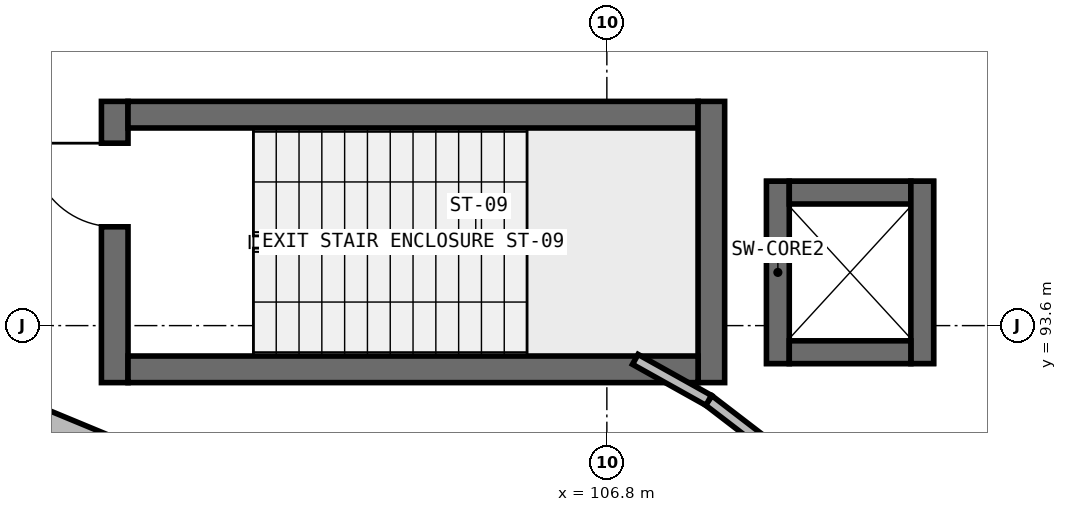
"""IFC4 building model, lengths in metres.
Left out: names, types, materials, properties, quantities, classifications, styles, units other than length and angle.
Written with IfcOpenShell. Run it as: python <this file> out.ifc"""

import sys

from ifc_helpers import new_model, si_unit, direction, frame, frame_2d, origin, place, context, subcontext, project, spatial, rectangle, extrude, element, fill, save


model = new_model("IFC4")
c1 = context("Model", 3, precision=1e-05, world=origin(), true_north=direction((0.0, 1.0)))
c2 = subcontext(c1, "Body", "Model", "MODEL_VIEW")
j1 = project(units=[si_unit("LENGTHUNIT", "METRE"), si_unit("PLANEANGLEUNIT", "RADIAN")], contexts=[c1])
p1 = place(None, origin())
s1 = spatial("IfcSite", under=j1, at=p1, CompositionType="ELEMENT")
p2 = place(p1, origin())
s2 = spatial("IfcBuilding", under=s1, at=p2, CompositionType="ELEMENT")
p3 = place(p2, frame((0.0, 0.0, 9.8)))
s3 = spatial("IfcBuildingStorey", under=s2, at=p3, CompositionType="ELEMENT", Elevation=9.8)
p4 = place(p3, frame((100.325, 92.85, 0.0), z_axis=(0.0, 0.0, 1.0), x_axis=(0.0, 1.0, 0.0)))
e1 = element("IfcWall", 1, at=p4, inside=s3, PredefinedType="SHEAR", context=c2, shape_type="SweptSolid", body=[
    extrude(rectangle(XDim=3.7, YDim=0.35, at=frame_2d((1.85, 0.0))), origin(), (0.0, 0.0, 1.0), 4.55),
])
p5 = place(p4, frame((2.05, 0.0, 0.0)))
e2 = element("IfcOpeningElement", 2, at=p5, cuts=e1, PredefinedType="OPENING", context=c2, shape_type="SweptSolid", body=[
    extrude(rectangle(XDim=1.1, YDim=2.15, at=frame_2d((0.55, 1.075))), frame((0.0, 0.185, 0.0), z_axis=(0.0, -1.0, 0.0), x_axis=(1.0, 0.0, 0.0)), (0.0, 0.0, 1.0), 0.37),
])
p6 = place(p3, frame((100.5, 96.375, 0.0), z_axis=(0.0, 0.0, 1.0), x_axis=(1.0, 0.0, 0.0)))
e3 = element("IfcWall", 3, at=p6, inside=s3, PredefinedType="SHEAR", context=c2, shape_type="SweptSolid", body=[
    extrude(rectangle(XDim=7.5, YDim=0.35, at=frame_2d((3.75, 0.0))), origin(), (0.0, 0.0, 1.0), 4.55),
])
p7 = place(p3, frame((108.175, 96.55, 0.0), z_axis=(0.0, 0.0, 1.0), x_axis=(0.0, -1.0, 0.0)))
e4 = element("IfcWall", 4, at=p7, inside=s3, PredefinedType="SHEAR", context=c2, shape_type="SweptSolid", body=[
    extrude(rectangle(XDim=3.7, YDim=0.35, at=frame_2d((1.85, 0.0))), origin(), (0.0, 0.0, 1.0), 4.55),
])
p8 = place(p3, frame((108.0, 93.025, 0.0), z_axis=(0.0, 0.0, 1.0), x_axis=(-1.0, 0.0, 0.0)))
e5 = element("IfcWall", 5, at=p8, inside=s3, PredefinedType="SHEAR", context=c2, shape_type="SweptSolid", body=[
    extrude(rectangle(XDim=7.5, YDim=0.35, at=frame_2d((3.75, 0.0))), origin(), (0.0, 0.0, 1.0), 4.55),
])
p9 = place(p3, frame((109.05, 93.1, 0.0), z_axis=(0.0, 0.0, 1.0), x_axis=(0.0, 1.0, 0.0)))
e6 = element("IfcWall", 6, at=p9, inside=s3, PredefinedType="SHEAR", context=c2, shape_type="SweptSolid", body=[
    extrude(rectangle(XDim=2.4, YDim=0.3, at=frame_2d((1.2, 0.0))), origin(), (0.0, 0.0, 1.0), 4.37),
])
p10 = place(p3, frame((109.2, 95.35, 0.0), z_axis=(0.0, 0.0, 1.0), x_axis=(1.0, 0.0, 0.0)))
e7 = element("IfcWall", 7, at=p10, inside=s3, PredefinedType="SHEAR", context=c2, shape_type="SweptSolid", body=[
    extrude(rectangle(XDim=1.6, YDim=0.3, at=frame_2d((0.8, 0.0))), origin(), (0.0, 0.0, 1.0), 4.37),
])
p11 = place(p3, frame((110.95, 95.5, 0.0), z_axis=(0.0, 0.0, 1.0), x_axis=(0.0, -1.0, 0.0)))
e8 = element("IfcWall", 8, at=p11, inside=s3, PredefinedType="SHEAR", context=c2, shape_type="SweptSolid", body=[
    extrude(rectangle(XDim=2.4, YDim=0.3, at=frame_2d((1.2, 0.0))), origin(), (0.0, 0.0, 1.0), 4.37),
])
p12 = place(p3, frame((110.8, 93.25, 0.0), z_axis=(0.0, 0.0, 1.0), x_axis=(-1.0, 0.0, 0.0)))
e9 = element("IfcWall", 9, at=p12, inside=s3, PredefinedType="SHEAR", context=c2, shape_type="SweptSolid", body=[
    extrude(rectangle(XDim=1.6, YDim=0.3, at=frame_2d((0.8, 0.0))), origin(), (0.0, 0.0, 1.0), 4.37),
])
p13 = place(p3, frame((106.325, 89.483, 0.0), z_axis=(0.0, 0.0, 1.0), x_axis=(-0.92385889973, 0.382733240508, 0.0)))
e10 = element("IfcWall", 10, at=p13, inside=s3, PredefinedType="SOLIDWALL", context=c2, shape_type="SweptSolid", body=[
    extrude(rectangle(XDim=10.081, YDim=0.29, at=frame_2d((5.04, 0.0))), origin(), (0.0, 0.0, 1.0), 4.37),
])
p14 = place(p13, frame((4.295, 0.0, 0.95)))
e11 = element("IfcOpeningElement", 11, at=p14, cuts=e10, PredefinedType="OPENING", context=c2, shape_type="SweptSolid", body=[
    extrude(rectangle(XDim=1.49, YDim=1.59, at=frame_2d((0.745, 0.795))), frame((0.0, 0.155, 0.0), z_axis=(0.0, -1.0, 0.0), x_axis=(1.0, 0.0, 0.0)), (0.0, 0.0, 1.0), 0.31),
])
p15 = place(p3, frame((96.748, 92.366, 0.0), z_axis=(0.0, 0.0, 1.0), x_axis=(0.923848052238, -0.382759423628, 0.0)))
e12 = element("IfcWall", 12, at=p15, inside=s3, PredefinedType="SOLIDWALL", context=c2, shape_type="SweptSolid", body=[
    extrude(rectangle(XDim=9.821, YDim=0.29, at=frame_2d((4.91, 0.0))), origin(), (0.0, 0.0, 1.0), 4.37),
])
p16 = place(p15, frame((1.38, 0.0, 0.95)))
e13 = element("IfcOpeningElement", 13, at=p16, cuts=e12, PredefinedType="OPENING", context=c2, shape_type="SweptSolid", body=[
    extrude(rectangle(XDim=2.15, YDim=1.48, at=frame_2d((1.075, 0.74))), frame((0.0, 0.155, 0.0), z_axis=(0.0, -1.0, 0.0), x_axis=(1.0, 0.0, 0.0)), (0.0, 0.0, 1.0), 0.31),
])
p17 = place(p15, frame((6.291, 0.0, 0.95)))
e14 = element("IfcOpeningElement", 14, at=p17, cuts=e12, PredefinedType="OPENING", context=c2, shape_type="SweptSolid", body=[
    extrude(rectangle(XDim=2.15, YDim=1.48, at=frame_2d((1.075, 0.74))), frame((0.0, 0.155, 0.0), z_axis=(0.0, -1.0, 0.0), x_axis=(1.0, 0.0, 0.0)), (0.0, 0.0, 1.0), 0.31),
])
p18 = place(p3, frame((116.896, 85.896, 0.0), z_axis=(0.0, 0.0, 1.0), x_axis=(-0.793301872689, 0.608828497024, 0.0)))
e15 = element("IfcWall", 15, at=p18, inside=s3, PredefinedType="PARTITIONING", context=c2, shape_type="SweptSolid", body=[
    extrude(rectangle(XDim=11.038, YDim=0.15, at=frame_2d((5.519, 0.0))), origin(), (0.0, 0.0, 1.0), 3.737),
])
p19 = place(p18, frame((4.95, 0.0, 0.0)))
e16 = element("IfcOpeningElement", 16, at=p19, cuts=e15, PredefinedType="OPENING", context=c2, shape_type="SweptSolid", body=[
    extrude(rectangle(XDim=1.1, YDim=2.2, at=frame_2d((0.55, 1.1))), frame((0.0, 0.085, 0.0), z_axis=(0.0, -1.0, 0.0), x_axis=(1.0, 0.0, 0.0)), (0.0, 0.0, 1.0), 0.17),
])
p20 = place(p3, frame((108.14, 92.616, 0.0), z_axis=(0.0, 0.0, 1.0), x_axis=(-0.872821867213, 0.488038920697, 0.0)))
e17 = element("IfcWall", 17, at=p20, inside=s3, PredefinedType="PARTITIONING", context=c2, shape_type="SweptSolid", body=[
    extrude(rectangle(XDim=1.106, YDim=0.15, at=frame_2d((0.553, 0.0))), origin(), (0.0, 0.0, 1.0), 4.3),
])
p21 = place(p3, frame((97.943, 96.839, 0.0), z_axis=(0.0, 0.0, 1.0), x_axis=(0.258832719409, 0.965922162166, 0.0)))
e18 = element("IfcWall", 18, at=p21, inside=s3, PredefinedType="PARTITIONING", context=c2, shape_type="SweptSolid", body=[
    extrude(rectangle(XDim=6.44, YDim=0.15, at=frame_2d((3.22, 0.0))), origin(), (0.0, 0.0, 1.0), 3.737),
])
p22 = place(p5, origin())
e19 = element("IfcDoor", 19, at=p22, inside=s3, OperationType="SINGLE_SWING_RIGHT", PredefinedType="DOOR", context=c2, shape_type="SweptSolid", body=[
    extrude(rectangle(XDim=1.1, YDim=2.15, at=frame_2d((0.55, 1.075))), frame((0.0, 0.025, 0.0), z_axis=(0.0, -1.0, 0.0), x_axis=(1.0, 0.0, 0.0)), (0.0, 0.0, 1.0), 0.05),
])
fill(e2, e19)
save(model, sys.argv[1])
